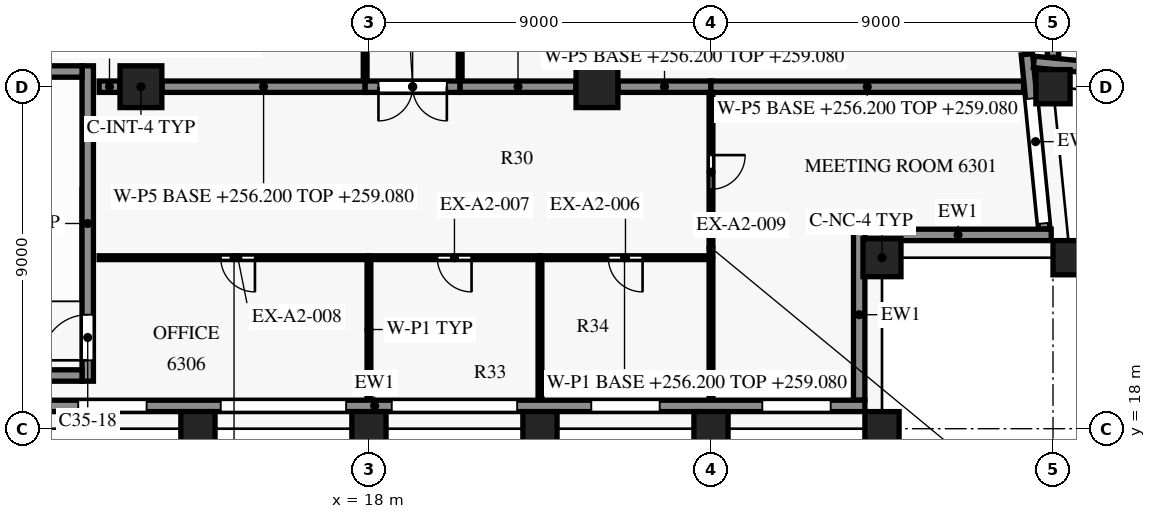
"""IFC4 building model, lengths in metres.
Left out: names, types, materials, properties, quantities, classifications, styles, units other than length and angle.
Written with IfcOpenShell. Run it as: python <this file> out.ifc"""

import sys

from ifc_helpers import new_model, si_unit, direction, frame, frame_2d, origin, origin_2d, place, context, subcontext, project, spatial, rectangle, extrude, element, fill, save


model = new_model("IFC4")
c1 = context("Model", 3, precision=1e-05, world=origin(), true_north=direction((0.0, 1.0)))
c2 = subcontext(c1, "Body", "Model", "MODEL_VIEW")
j1 = project(units=[si_unit("LENGTHUNIT", "METRE"), si_unit("PLANEANGLEUNIT", "RADIAN")], contexts=[c1])
p1 = place(None, origin())
s1 = spatial("IfcSite", under=j1, at=p1, CompositionType="ELEMENT")
p2 = place(p1, origin())
s2 = spatial("IfcBuilding", under=s1, at=p2, CompositionType="ELEMENT")
p3 = place(p2, frame((0.0, 0.0, 256.2)))
s3 = spatial("IfcBuildingStorey", under=s2, at=p3, CompositionType="ELEMENT", Elevation=256.2)
for number, where, z_axis, x_axis in (
    (1, (13.5, 18.0, 0.0), (0.0, 0.0, 1.0), (1.0, 0.0, 0.0)),
    (2, (18.0, 18.0, 0.0), (0.0, 0.0, 1.0), (1.0, 0.0, 0.0)),
    (3, (22.5, 18.0, 0.0), (0.0, 0.0, 1.0), (1.0, 0.0, 0.0)),
    (4, (27.0, 18.0, 0.0), (0.0, 0.0, 1.0), (1.0, 0.0, 0.0)),
    (5, (31.5, 18.0, 0.0), (0.0, 0.0, 1.0), (1.0, 0.0, 0.0)),
    (6, (36.45, 22.5, 0.0), (0.0, 0.0, 1.0), (-0.1, 0.995, 0.0)),
    (7, (36.0, 27.0, 0.0), (0.0, 0.0, 1.0), (-0.1, 0.995, 0.0)),
):
    element("IfcColumn", number, at=place(p3, frame(where, z_axis=z_axis, x_axis=x_axis)), inside=s3, PredefinedType="COLUMN", context=c2, shape_type="SweptSolid", body=[
        extrude(rectangle(XDim=0.9, YDim=0.9, at=origin_2d()), origin(), (0.0, 0.0, 1.0), 3.8),
    ])
p4 = place(p3, frame((31.5, 22.5, 0.0), z_axis=(0.0, 0.0, 1.0), x_axis=(1.0, 0.0, 0.0)))
e8 = element("IfcColumn", 8, at=p4, inside=s3, PredefinedType="COLUMN", context=c2, shape_type="SweptSolid", body=[
    extrude(rectangle(XDim=1.0, YDim=1.0, at=origin_2d()), origin(), (0.0, 0.0, 1.0), 3.8),
])
for number, where, z_axis, x_axis in (
    (9, (12.0, 27.0, 0.0), (0.0, 0.0, 1.0), (1.0, 0.0, 0.0)),
    (10, (24.0, 27.0, 0.0), (0.0, 0.0, 1.0), (1.0, 0.0, 0.0)),
):
    element("IfcColumn", number, at=place(p3, frame(where, z_axis=z_axis, x_axis=x_axis)), inside=s3, PredefinedType="COLUMN", context=c2, shape_type="SweptSolid", body=[
        extrude(rectangle(XDim=1.1, YDim=1.1, at=origin_2d()), origin(), (0.0, 0.0, 1.0), 3.8),
    ])
p5 = place(p3, frame((31.05, 18.6, 0.0), z_axis=(0.0, 0.0, 1.0), x_axis=(-1.0, 0.0, 0.0)))
e11 = element("IfcWall", 11, at=p5, inside=s3, PredefinedType="SOLIDWALL", context=c2, shape_type="SweptSolid", body=[
    extrude(rectangle(XDim=25.8, YDim=0.3, at=frame_2d((12.9, 0.0))), origin(), (0.0, 0.0, 1.0), 3.15),
])
p6 = place(p5, frame((0.9, 0.0, 0.75)))
e12 = element("IfcOpeningElement", 12, at=p6, cuts=e11, PredefinedType="OPENING", context=c2, shape_type="SweptSolid", body=[
    extrude(rectangle(XDim=1.8, YDim=1.8, at=frame_2d((0.9, 0.9))), frame((0.0, 0.16, 0.0), z_axis=(0.0, -1.0, 0.0), x_axis=(1.0, 0.0, 0.0)), (0.0, 0.0, 1.0), 0.32),
])
p7 = place(p5, frame((5.4, 0.0, 0.75)))
e13 = element("IfcOpeningElement", 13, at=p7, cuts=e11, PredefinedType="OPENING", context=c2, shape_type="SweptSolid", body=[
    extrude(rectangle(XDim=1.8, YDim=1.8, at=frame_2d((0.9, 0.9))), frame((0.0, 0.16, 0.0), z_axis=(0.0, -1.0, 0.0), x_axis=(1.0, 0.0, 0.0)), (0.0, 0.0, 1.0), 0.32),
])
p8 = place(p5, frame((9.15, 0.0, 0.15)))
e14 = element("IfcOpeningElement", 14, at=p8, cuts=e11, PredefinedType="OPENING", context=c2, shape_type="SweptSolid", body=[
    extrude(rectangle(XDim=3.3, YDim=2.4, at=frame_2d((1.65, 1.2))), frame((0.0, 0.16, 0.0), z_axis=(0.0, -1.0, 0.0), x_axis=(1.0, 0.0, 0.0)), (0.0, 0.0, 1.0), 0.32),
])
p9 = place(p5, frame((13.65, 0.0, 0.15)))
e15 = element("IfcOpeningElement", 15, at=p9, cuts=e11, PredefinedType="OPENING", context=c2, shape_type="SweptSolid", body=[
    extrude(rectangle(XDim=3.3, YDim=2.4, at=frame_2d((1.65, 1.2))), frame((0.0, 0.16, 0.0), z_axis=(0.0, -1.0, 0.0), x_axis=(1.0, 0.0, 0.0)), (0.0, 0.0, 1.0), 0.32),
])
p10 = place(p5, frame((18.9, 0.0, 0.75)))
e16 = element("IfcOpeningElement", 16, at=p10, cuts=e11, PredefinedType="OPENING", context=c2, shape_type="SweptSolid", body=[
    extrude(rectangle(XDim=1.8, YDim=1.8, at=frame_2d((0.9, 0.9))), frame((0.0, 0.16, 0.0), z_axis=(0.0, -1.0, 0.0), x_axis=(1.0, 0.0, 0.0)), (0.0, 0.0, 1.0), 0.32),
])
p11 = place(p3, frame((30.9, 23.25, 0.0), z_axis=(0.0, 0.0, 1.0), x_axis=(0.0, -1.0, 0.0)))
e17 = element("IfcWall", 17, at=p11, inside=s3, PredefinedType="SOLIDWALL", context=c2, shape_type="SweptSolid", body=[
    extrude(rectangle(XDim=4.5, YDim=0.3, at=frame_2d((2.25, 0.0))), origin(), (0.0, 0.0, 1.0), 3.15),
])
p12 = place(p3, frame((35.953, 23.1, 0.0), z_axis=(0.0, 0.0, 1.0), x_axis=(-1.0, 0.0, 0.0)))
e18 = element("IfcWall", 18, at=p12, inside=s3, PredefinedType="SOLIDWALL", context=c2, shape_type="SweptSolid", body=[
    extrude(rectangle(XDim=4.903, YDim=0.3, at=frame_2d((2.451, 0.0))), origin(), (0.0, 0.0, 1.0), 3.15),
])
p13 = place(p3, frame((35.312, 27.852, 0.0), z_axis=(0.0, 0.0, 1.0), x_axis=(0.099503719021, -0.99503719021, 0.0)))
e19 = element("IfcWall", 19, at=p13, inside=s3, PredefinedType="SOLIDWALL", context=c2, shape_type="SweptSolid", body=[
    extrude(rectangle(XDim=4.62, YDim=0.3, at=frame_2d((2.31, 0.0))), origin(), (0.0, 0.0, 1.0), 3.15),
])
p14 = place(p13, frame((1.17, 0.0, 0.15)))
e20 = element("IfcOpeningElement", 20, at=p14, cuts=e19, PredefinedType="OPENING", context=c2, shape_type="SweptSolid", body=[
    extrude(rectangle(XDim=3.3, YDim=2.4, at=frame_2d((1.65, 1.2))), frame((0.0, 0.16, 0.0), z_axis=(0.0, -1.0, 0.0), x_axis=(1.0, 0.0, 0.0)), (0.0, 0.0, 1.0), 0.32),
])
p15 = place(p3, frame((40.065, 27.197, 0.0), z_axis=(0.0, 0.0, 1.0), x_axis=(-0.995036663613, 0.099508984853, 0.0)))
e21 = element("IfcWall", 21, at=p15, inside=s3, PredefinedType="SOLIDWALL", context=c2, shape_type="SweptSolid", body=[
    extrude(rectangle(XDim=4.59, YDim=0.3, at=frame_2d((2.295, 0.0))), origin(), (0.0, 0.0, 1.0), 3.15),
])
p16 = place(p15, frame((0.15, 0.0, 0.15)))
e22 = element("IfcOpeningElement", 22, at=p16, cuts=e21, PredefinedType="OPENING", context=c2, shape_type="SweptSolid", body=[
    extrude(rectangle(XDim=3.3, YDim=2.4, at=frame_2d((1.65, 1.2))), frame((0.0, 0.16, 0.0), z_axis=(0.0, -1.0, 0.0), x_axis=(1.0, 0.0, 0.0)), (0.0, 0.0, 1.0), 0.32),
])
for number, where, z_axis, x_axis in (
    (23, (7.15, 19.4, 0.0), (0.0, 0.0, 1.0), (1.0, 0.0, 0.0)),
    (24, (7.15, 27.4, 0.0), (0.0, 0.0, 1.0), (1.0, 0.0, 0.0)),
):
    element("IfcWall", number, at=place(p3, frame(where, z_axis=z_axis, x_axis=x_axis)), inside=s3, PredefinedType="SHEAR", context=c2, shape_type="SweptSolid", body=[
        extrude(rectangle(XDim=3.3, YDim=0.3, at=frame_2d((1.65, 0.0))), origin(), (0.0, 0.0, 1.0), 3.5),
    ])
p17 = place(p3, frame((10.6, 19.25, 0.0), z_axis=(0.0, 0.0, 1.0), x_axis=(0.0, 1.0, 0.0)))
e25 = element("IfcWall", 25, at=p17, inside=s3, PredefinedType="SHEAR", context=c2, shape_type="SweptSolid", body=[
    extrude(rectangle(XDim=8.3, YDim=0.3, at=frame_2d((4.15, 0.0))), origin(), (0.0, 0.0, 1.0), 3.5),
])
p18 = place(p17, frame((0.55, 0.0, 0.0)))
e26 = element("IfcOpeningElement", 26, at=p18, cuts=e25, PredefinedType="OPENING", context=c2, shape_type="SweptSolid", body=[
    extrude(rectangle(XDim=1.2, YDim=2.2, at=frame_2d((0.6, 1.1))), frame((0.0, 0.16, 0.0), z_axis=(0.0, -1.0, 0.0), x_axis=(1.0, 0.0, 0.0)), (0.0, 0.0, 1.0), 0.32),
])
for number, where, z_axis, x_axis in (
    (27, (18.0, 18.77, 0.0), (0.0, 0.0, 1.0), (0.0, 1.0, 0.0)),
    (28, (22.5, 18.77, 0.0), (0.0, 0.0, 1.0), (0.0, 1.0, 0.0)),
    (29, (27.0, 22.45, 0.0), (0.0, 0.0, 1.0), (0.0, -1.0, 0.0)),
):
    element("IfcWall", number, at=place(p3, frame(where, z_axis=z_axis, x_axis=x_axis)), inside=s3, PredefinedType="PARTITIONING", context=c2, shape_type="SweptSolid", body=[
        extrude(rectangle(XDim=3.68, YDim=0.1, at=frame_2d((1.84, 0.0))), origin(), (0.0, 0.0, 1.0), 3.48),
    ])
p19 = place(p3, frame((18.0, 22.5, 0.0), z_axis=(0.0, 0.0, 1.0), x_axis=(-1.0, 0.0, 0.0)))
e30 = element("IfcWall", 30, at=p19, inside=s3, PredefinedType="PARTITIONING", context=c2, shape_type="SweptSolid", body=[
    extrude(rectangle(XDim=7.1, YDim=0.1, at=frame_2d((3.55, 0.0))), origin(), (0.0, 0.0, 1.0), 2.88),
])
p20 = place(p19, frame((3.0, 0.0, 0.0)))
e31 = element("IfcOpeningElement", 31, at=p20, cuts=e30, PredefinedType="OPENING", context=c2, shape_type="SweptSolid", body=[
    extrude(rectangle(XDim=0.9, YDim=2.1, at=frame_2d((0.45, 1.05))), frame((0.0, 0.06, 0.0), z_axis=(0.0, -1.0, 0.0), x_axis=(1.0, 0.0, 0.0)), (0.0, 0.0, 1.0), 0.12),
])
p21 = place(p3, frame((22.5, 22.5, 0.0), z_axis=(0.0, 0.0, 1.0), x_axis=(-1.0, 0.0, 0.0)))
e32 = element("IfcWall", 32, at=p21, inside=s3, PredefinedType="PARTITIONING", context=c2, shape_type="SweptSolid", body=[
    extrude(rectangle(XDim=4.5, YDim=0.1, at=frame_2d((2.25, 0.0))), origin(), (0.0, 0.0, 1.0), 3.48),
])
p22 = place(p21, frame((1.8, 0.0, 0.0)))
e33 = element("IfcOpeningElement", 33, at=p22, cuts=e32, PredefinedType="OPENING", context=c2, shape_type="SweptSolid", body=[
    extrude(rectangle(XDim=0.9, YDim=2.1, at=frame_2d((0.45, 1.05))), frame((0.0, 0.06, 0.0), z_axis=(0.0, -1.0, 0.0), x_axis=(1.0, 0.0, 0.0)), (0.0, 0.0, 1.0), 0.12),
])
p23 = place(p3, frame((26.95, 22.5, 0.0), z_axis=(0.0, 0.0, 1.0), x_axis=(-1.0, 0.0, 0.0)))
e34 = element("IfcWall", 34, at=p23, inside=s3, PredefinedType="PARTITIONING", context=c2, shape_type="SweptSolid", body=[
    extrude(rectangle(XDim=4.45, YDim=0.1, at=frame_2d((2.225, 0.0))), origin(), (0.0, 0.0, 1.0), 2.88),
])
p24 = place(p23, frame((1.75, 0.0, 0.0)))
e35 = element("IfcOpeningElement", 35, at=p24, cuts=e34, PredefinedType="OPENING", context=c2, shape_type="SweptSolid", body=[
    extrude(rectangle(XDim=0.9, YDim=2.1, at=frame_2d((0.45, 1.05))), frame((0.0, 0.06, 0.0), z_axis=(0.0, -1.0, 0.0), x_axis=(1.0, 0.0, 0.0)), (0.0, 0.0, 1.0), 0.12),
])
p25 = place(p3, frame((27.0, 26.83, 0.0), z_axis=(0.0, 0.0, 1.0), x_axis=(0.0, -1.0, 0.0)))
e36 = element("IfcWall", 36, at=p25, inside=s3, PredefinedType="PARTITIONING", context=c2, shape_type="SweptSolid", body=[
    extrude(rectangle(XDim=4.28, YDim=0.1, at=frame_2d((2.14, 0.0))), origin(), (0.0, 0.0, 1.0), 2.88),
])
p26 = place(p25, frame((1.63, 0.0, 0.0)))
e37 = element("IfcOpeningElement", 37, at=p26, cuts=e36, PredefinedType="OPENING", context=c2, shape_type="SweptSolid", body=[
    extrude(rectangle(XDim=0.9, YDim=2.1, at=frame_2d((0.45, 1.05))), frame((0.0, 0.06, 0.0), z_axis=(0.0, -1.0, 0.0), x_axis=(1.0, 0.0, 0.0)), (0.0, 0.0, 1.0), 0.12),
])
p27 = place(p3, frame((10.9, 27.0, 0.0), z_axis=(0.0, 0.0, 1.0), x_axis=(1.0, 0.0, 0.0)))
e38 = element("IfcWall", 38, at=p27, inside=s3, PredefinedType="PARTITIONING", context=c2, shape_type="SweptSolid", body=[
    extrude(rectangle(XDim=0.545, YDim=0.3, at=frame_2d((0.272, 0.0))), origin(), (0.0, 0.0, 1.0), 3.48),
])
p28 = place(p3, frame((12.555, 27.0, 0.0), z_axis=(0.0, 0.0, 1.0), x_axis=(1.0, 0.0, 0.0)))
e39 = element("IfcWall", 39, at=p28, inside=s3, PredefinedType="PARTITIONING", context=c2, shape_type="SweptSolid", body=[
    extrude(rectangle(XDim=5.345, YDim=0.3, at=frame_2d((2.672, 0.0))), origin(), (0.0, 0.0, 1.0), 2.88),
])
p29 = place(p3, frame((20.4, 27.0, 0.0), z_axis=(0.0, 0.0, 1.0), x_axis=(-1.0, 0.0, 0.0)))
e40 = element("IfcWall", 40, at=p29, inside=s3, PredefinedType="PARTITIONING", context=c2, shape_type="SweptSolid", body=[
    extrude(rectangle(XDim=2.5, YDim=0.3, at=frame_2d((1.25, 0.0))), origin(), (0.0, 0.0, 1.0), 2.88),
])
p30 = place(p29, frame((0.35, 0.0, 0.0)))
e41 = element("IfcOpeningElement", 41, at=p30, cuts=e40, PredefinedType="OPENING", context=c2, shape_type="SweptSolid", body=[
    extrude(rectangle(XDim=1.8, YDim=2.1, at=frame_2d((0.9, 1.05))), frame((0.0, 0.16, 0.0), z_axis=(0.0, -1.0, 0.0), x_axis=(1.0, 0.0, 0.0)), (0.0, 0.0, 1.0), 0.32),
])
p31 = place(p3, frame((20.4, 27.0, 0.0), z_axis=(0.0, 0.0, 1.0), x_axis=(1.0, 0.0, 0.0)))
e42 = element("IfcWall", 42, at=p31, inside=s3, PredefinedType="PARTITIONING", context=c2, shape_type="SweptSolid", body=[
    extrude(rectangle(XDim=3.045, YDim=0.3, at=frame_2d((1.522, 0.0))), origin(), (0.0, 0.0, 1.0), 2.88),
])
p32 = place(p3, frame((24.555, 27.0, 0.0), z_axis=(0.0, 0.0, 1.0), x_axis=(1.0, 0.0, 0.0)))
e43 = element("IfcWall", 43, at=p32, inside=s3, PredefinedType="PARTITIONING", context=c2, shape_type="SweptSolid", body=[
    extrude(rectangle(XDim=2.445, YDim=0.3, at=frame_2d((1.223, 0.0))), origin(), (0.0, 0.0, 1.0), 2.88),
])
p33 = place(p3, frame((27.0, 27.0, 0.0), z_axis=(0.0, 0.0, 1.0), x_axis=(1.0, 0.0, 0.0)))
e44 = element("IfcWall", 44, at=p33, inside=s3, PredefinedType="PARTITIONING", context=c2, shape_type="SweptSolid", body=[
    extrude(rectangle(XDim=8.226, YDim=0.3, at=frame_2d((4.113, 0.0))), origin(), (0.0, 0.0, 1.0), 2.88),
])
p34 = place(p3, frame((17.9, 27.17, 0.0), z_axis=(0.0, 0.0, 1.0), x_axis=(0.0, 1.0, 0.0)))
e45 = element("IfcWall", 45, at=p34, inside=s3, PredefinedType="PARTITIONING", context=c2, shape_type="SweptSolid", body=[
    extrude(rectangle(XDim=6.28, YDim=0.1, at=frame_2d((3.14, 0.0))), origin(), (0.0, 0.0, 1.0), 2.88),
])
p35 = place(p3, frame((36.0, 27.774, 0.0), z_axis=(0.0, 0.0, 1.0), x_axis=(0.0, 1.0, 0.0)))
e46 = element("IfcWall", 46, at=p35, inside=s3, PredefinedType="PARTITIONING", context=c2, shape_type="SweptSolid", body=[
    extrude(rectangle(XDim=8.176, YDim=0.3, at=frame_2d((4.088, 0.0))), origin(), (0.0, 0.0, 1.0), 2.88),
])
p36 = place(p3, frame((20.4, 33.45, 0.0), z_axis=(0.0, 0.0, 1.0), x_axis=(0.0, -1.0, 0.0)))
e47 = element("IfcWall", 47, at=p36, inside=s3, PredefinedType="PARTITIONING", context=c2, shape_type="SweptSolid", body=[
    extrude(rectangle(XDim=6.28, YDim=0.1, at=frame_2d((3.14, 0.0))), origin(), (0.0, 0.0, 1.0), 2.88),
])
p37 = place(p6, origin())
e48 = element("IfcWindow", 48, at=p37, inside=s3, PartitioningType="SINGLE_PANEL", PredefinedType="WINDOW", context=c2, shape_type="SweptSolid", body=[
    extrude(rectangle(XDim=1.8, YDim=1.8, at=frame_2d((0.9, 0.9))), frame((0.0, 0.03, 0.0), z_axis=(0.0, -1.0, 0.0), x_axis=(1.0, 0.0, 0.0)), (0.0, 0.0, 1.0), 0.06),
])
fill(e12, e48)
p38 = place(p7, origin())
e49 = element("IfcWindow", 49, at=p38, inside=s3, PartitioningType="SINGLE_PANEL", PredefinedType="WINDOW", context=c2, shape_type="SweptSolid", body=[
    extrude(rectangle(XDim=1.8, YDim=1.8, at=frame_2d((0.9, 0.9))), frame((0.0, 0.03, 0.0), z_axis=(0.0, -1.0, 0.0), x_axis=(1.0, 0.0, 0.0)), (0.0, 0.0, 1.0), 0.06),
])
fill(e13, e49)
p39 = place(p8, origin())
e50 = element("IfcWindow", 50, at=p39, inside=s3, PartitioningType="SINGLE_PANEL", PredefinedType="WINDOW", context=c2, shape_type="SweptSolid", body=[
    extrude(rectangle(XDim=3.3, YDim=2.4, at=frame_2d((1.65, 1.2))), frame((0.0, 0.03, 0.0), z_axis=(0.0, -1.0, 0.0), x_axis=(1.0, 0.0, 0.0)), (0.0, 0.0, 1.0), 0.06),
])
fill(e14, e50)
p40 = place(p9, origin())
e51 = element("IfcWindow", 51, at=p40, inside=s3, PartitioningType="SINGLE_PANEL", PredefinedType="WINDOW", context=c2, shape_type="SweptSolid", body=[
    extrude(rectangle(XDim=3.3, YDim=2.4, at=frame_2d((1.65, 1.2))), frame((0.0, 0.03, 0.0), z_axis=(0.0, -1.0, 0.0), x_axis=(1.0, 0.0, 0.0)), (0.0, 0.0, 1.0), 0.06),
])
fill(e15, e51)
p41 = place(p10, origin())
e52 = element("IfcWindow", 52, at=p41, inside=s3, PartitioningType="SINGLE_PANEL", PredefinedType="WINDOW", context=c2, shape_type="SweptSolid", body=[
    extrude(rectangle(XDim=1.8, YDim=1.8, at=frame_2d((0.9, 0.9))), frame((0.0, 0.03, 0.0), z_axis=(0.0, -1.0, 0.0), x_axis=(1.0, 0.0, 0.0)), (0.0, 0.0, 1.0), 0.06),
])
fill(e16, e52)
p42 = place(p14, origin())
e53 = element("IfcWindow", 53, at=p42, inside=s3, PartitioningType="SINGLE_PANEL", PredefinedType="WINDOW", context=c2, shape_type="SweptSolid", body=[
    extrude(rectangle(XDim=3.3, YDim=2.4, at=frame_2d((1.65, 1.2))), frame((0.0, 0.03, 0.0), z_axis=(0.0, -1.0, 0.0), x_axis=(1.0, 0.0, 0.0)), (0.0, 0.0, 1.0), 0.06),
])
fill(e20, e53)
p43 = place(p18, origin())
e54 = element("IfcDoor", 54, at=p43, inside=s3, OperationType="SINGLE_SWING_RIGHT", PredefinedType="DOOR", context=c2, shape_type="SweptSolid", body=[
    extrude(rectangle(XDim=1.2, YDim=2.2, at=frame_2d((0.6, 1.1))), frame((0.0, 0.025, 0.0), z_axis=(0.0, -1.0, 0.0), x_axis=(1.0, 0.0, 0.0)), (0.0, 0.0, 1.0), 0.05),
])
fill(e26, e54)
p44 = place(p24, origin())
e55 = element("IfcDoor", 55, at=p44, inside=s3, OperationType="SINGLE_SWING_LEFT", PredefinedType="DOOR", context=c2, shape_type="SweptSolid", body=[
    extrude(rectangle(XDim=0.9, YDim=2.1, at=frame_2d((0.45, 1.05))), frame((0.0, 0.025, 0.0), z_axis=(0.0, -1.0, 0.0), x_axis=(1.0, 0.0, 0.0)), (0.0, 0.0, 1.0), 0.05),
])
fill(e35, e55)
p45 = place(p22, origin())
e56 = element("IfcDoor", 56, at=p45, inside=s3, OperationType="SINGLE_SWING_LEFT", PredefinedType="DOOR", context=c2, shape_type="SweptSolid", body=[
    extrude(rectangle(XDim=0.9, YDim=2.1, at=frame_2d((0.45, 1.05))), frame((0.0, 0.025, 0.0), z_axis=(0.0, -1.0, 0.0), x_axis=(1.0, 0.0, 0.0)), (0.0, 0.0, 1.0), 0.05),
])
fill(e33, e56)
p46 = place(p20, origin())
e57 = element("IfcDoor", 57, at=p46, inside=s3, OperationType="SINGLE_SWING_LEFT", PredefinedType="DOOR", context=c2, shape_type="SweptSolid", body=[
    extrude(rectangle(XDim=0.9, YDim=2.1, at=frame_2d((0.45, 1.05))), frame((0.0, 0.025, 0.0), z_axis=(0.0, -1.0, 0.0), x_axis=(1.0, 0.0, 0.0)), (0.0, 0.0, 1.0), 0.05),
])
fill(e31, e57)
p47 = place(p26, origin())
e58 = element("IfcDoor", 58, at=p47, inside=s3, OperationType="SINGLE_SWING_LEFT", PredefinedType="DOOR", context=c2, shape_type="SweptSolid", body=[
    extrude(rectangle(XDim=0.9, YDim=2.1, at=frame_2d((0.45, 1.05))), frame((0.0, 0.025, 0.0), z_axis=(0.0, -1.0, 0.0), x_axis=(1.0, 0.0, 0.0)), (0.0, 0.0, 1.0), 0.05),
])
fill(e37, e58)
p48 = place(p30, origin())
e59 = element("IfcDoor", 59, at=p48, inside=s3, OperationType="DOUBLE_DOOR_SINGLE_SWING", PredefinedType="DOOR", context=c2, shape_type="SweptSolid", body=[
    extrude(rectangle(XDim=1.8, YDim=2.1, at=frame_2d((0.9, 1.05))), frame((0.0, 0.025, 0.0), z_axis=(0.0, -1.0, 0.0), x_axis=(1.0, 0.0, 0.0)), (0.0, 0.0, 1.0), 0.05),
])
fill(e41, e59)
save(model, sys.argv[1])
